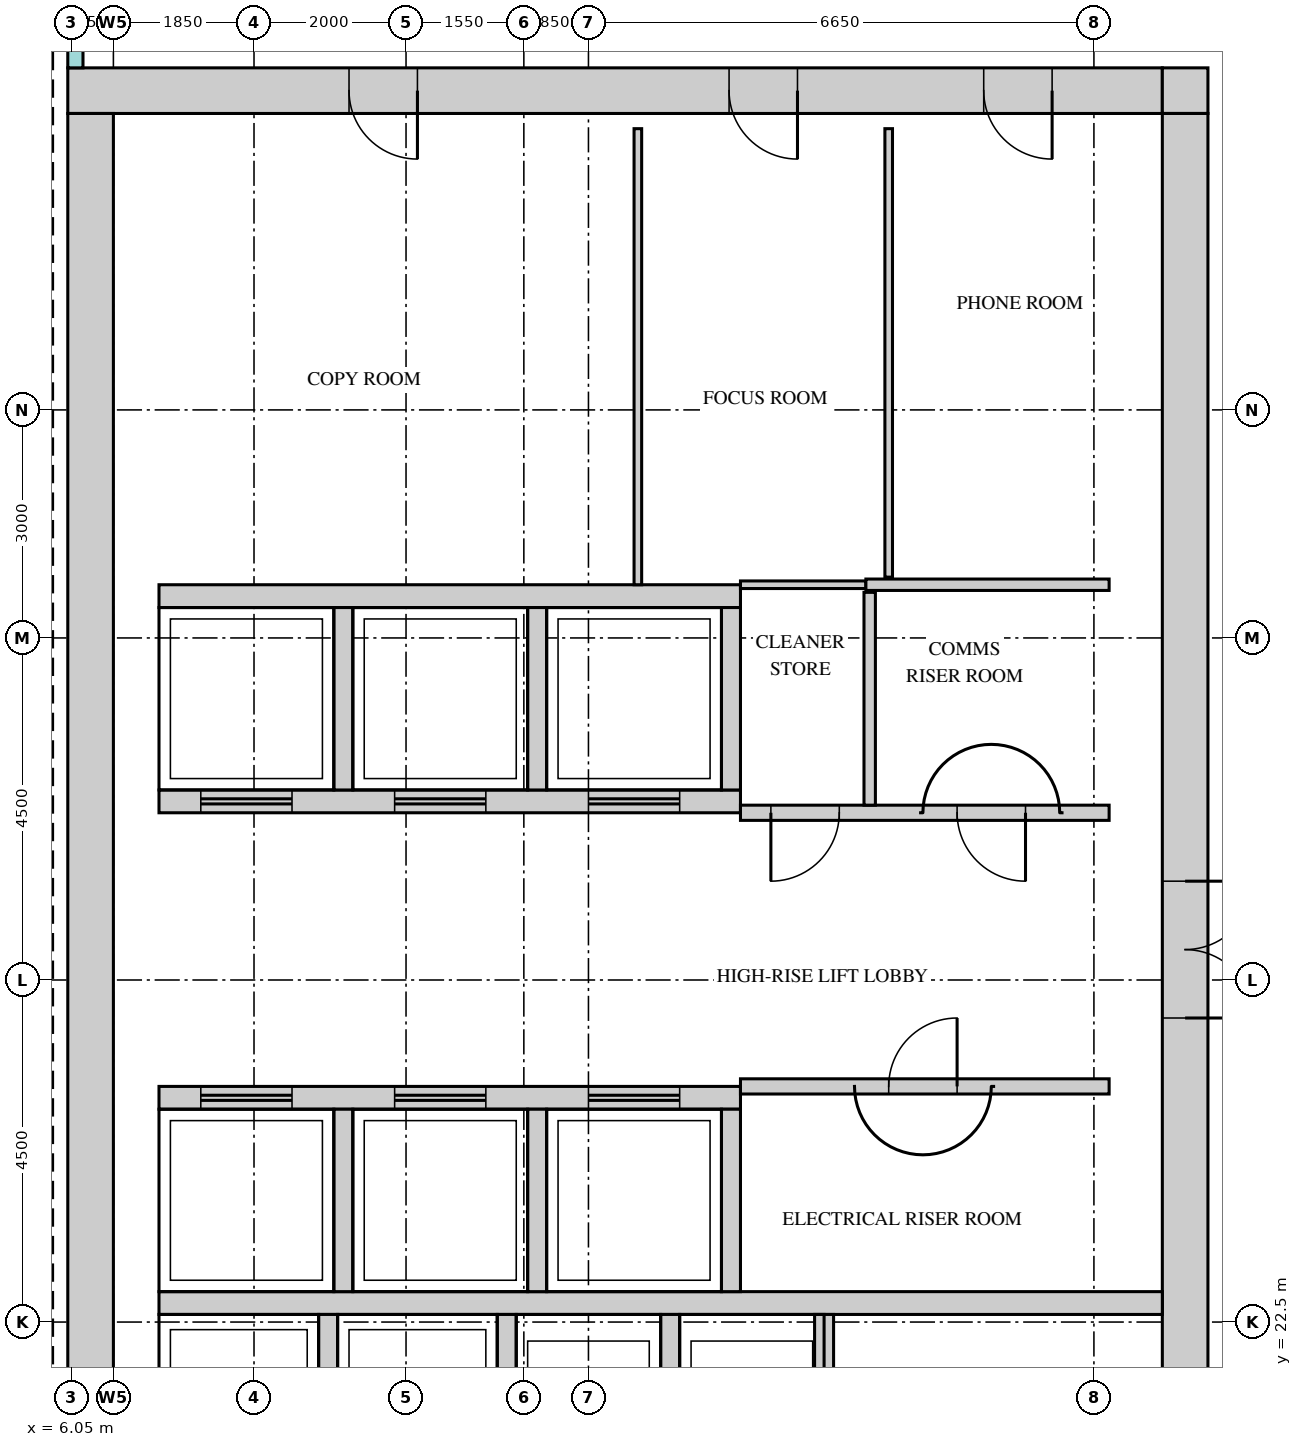
"""IFC4 building model, lengths in metres.
Left out: names, types, materials, properties, quantities, classifications, styles, units other than length and angle.
Written with IfcOpenShell. Run it as: python <this file> out.ifc"""

import sys

from ifc_helpers import new_model, si_unit, direction, frame, frame_2d, origin, place, context, subcontext, project, spatial, rectangle, extrude, source, transform, mapped, element, fill, save


model = new_model("IFC4")
c1 = context("Model", 3, precision=1e-05, world=origin(), true_north=direction((0.0, 1.0)))
c2 = subcontext(c1, "Body", "Model", "MODEL_VIEW")
j1 = project(units=[si_unit("LENGTHUNIT", "METRE"), si_unit("PLANEANGLEUNIT", "RADIAN")], contexts=[c1])
p1 = place(None, origin())
s1 = spatial("IfcSite", under=j1, at=p1, CompositionType="ELEMENT")
p2 = place(p1, origin())
s2 = spatial("IfcBuilding", under=s1, at=p2, CompositionType="ELEMENT")
p3 = place(p2, frame((0.0, 0.0, 298.2)))
s3 = spatial("IfcBuildingStorey", under=s2, at=p3, CompositionType="ELEMENT", Elevation=298.2)
m1 = source(origin(), c2, "Body", "SweptSolid", [
    extrude(rectangle(XDim=14.4, YDim=0.6, at=frame_2d((7.2, 0.0))), origin(), (0.0, 0.0, 1.0), 3.75),
])
p4 = place(p3, frame((6.0, 38.7, 0.0), z_axis=(0.0, 0.0, 1.0), x_axis=(1.0, 0.0, 0.0)))
e1 = element("IfcWall", 1, at=p4, inside=s3, PredefinedType="SHEAR", context=c2, shape_type="MappedRepresentation", body=[
    mapped(m1, transform((0.0, 0.0, 0.0))),
])
m2 = source(origin(), c2, "Body", "SweptSolid", [
    extrude(rectangle(XDim=0.9, YDim=2.1, at=frame_2d((0.45, 1.05))), frame((0.0, 0.31, 0.0), z_axis=(0.0, -1.0, 0.0), x_axis=(1.0, 0.0, 0.0)), (0.0, 0.0, 1.0), 0.62),
])
p5 = place(p4, frame((3.7, 0.0, 0.0)))
e2 = element("IfcOpeningElement", 2, at=p5, cuts=e1, PredefinedType="OPENING", context=c2, shape_type="MappedRepresentation", body=[
    mapped(m2, transform((0.0, 0.0, 0.0))),
])
p6 = place(p4, frame((8.7, 0.0, 0.0)))
e3 = element("IfcOpeningElement", 3, at=p6, cuts=e1, PredefinedType="OPENING", context=c2, shape_type="MappedRepresentation", body=[
    mapped(m2, transform((0.0, 0.0, 0.0))),
])
p7 = place(p4, frame((12.05, 0.0, 0.0)))
e4 = element("IfcOpeningElement", 4, at=p7, cuts=e1, PredefinedType="OPENING", context=c2, shape_type="MappedRepresentation", body=[
    mapped(m2, transform((0.0, 0.0, 0.0))),
])
m3 = source(origin(), c2, "Body", "SweptSolid", [
    extrude(rectangle(XDim=0.6, YDim=0.6, at=frame_2d((0.3, 0.0))), origin(), (0.0, 0.0, 1.0), 3.75),
])
p8 = place(p3, frame((20.4, 38.7, 0.0), z_axis=(0.0, 0.0, 1.0), x_axis=(1.0, 0.0, 0.0)))
e5 = element("IfcWall", 5, at=p8, inside=s3, PredefinedType="SHEAR", context=c2, shape_type="MappedRepresentation", body=[
    mapped(m3, transform((0.0, 0.0, 0.0))),
])
m4 = source(origin(), c2, "Body", "SweptSolid", [
    extrude(rectangle(XDim=22.8, YDim=0.6, at=frame_2d((11.4, 0.0))), origin(), (0.0, 0.0, 1.0), 3.75),
])
p9 = place(p3, frame((20.7, 15.6, 0.0), z_axis=(0.0, 0.0, 1.0), x_axis=(0.0, 1.0, 0.0)))
e6 = element("IfcWall", 6, at=p9, inside=s3, PredefinedType="SHEAR", context=c2, shape_type="MappedRepresentation", body=[
    mapped(m4, transform((0.0, 0.0, 0.0))),
])
m5 = source(origin(), c2, "Body", "SweptSolid", [
    extrude(rectangle(XDim=1.8, YDim=2.1, at=frame_2d((0.9, 1.05))), frame((0.0, 0.31, 0.0), z_axis=(0.0, -1.0, 0.0), x_axis=(1.0, 0.0, 0.0)), (0.0, 0.0, 1.0), 0.62),
])
p10 = place(p9, frame((10.9, 0.0, 0.0)))
e7 = element("IfcOpeningElement", 7, at=p10, cuts=e6, PredefinedType="OPENING", context=c2, shape_type="MappedRepresentation", body=[
    mapped(m5, transform((0.0, 0.0, 0.0))),
])
p11 = place(p9, frame((0.55, 0.0, 0.0)))
e8 = element("IfcOpeningElement", 8, at=p11, cuts=e6, PredefinedType="OPENING", context=c2, shape_type="MappedRepresentation", body=[
    mapped(m2, transform((0.0, 0.0, 0.0))),
])
p12 = place(p9, frame((4.1, 0.0, 0.0)))
e9 = element("IfcOpeningElement", 9, at=p12, cuts=e6, PredefinedType="OPENING", context=c2, shape_type="MappedRepresentation", body=[
    mapped(m2, transform((0.0, 0.0, 0.0))),
])
p13 = place(p3, frame((6.3, 15.6, 0.0), z_axis=(0.0, 0.0, 1.0), x_axis=(0.0, 1.0, 0.0)))
e10 = element("IfcWall", 10, at=p13, inside=s3, PredefinedType="SHEAR", context=c2, shape_type="MappedRepresentation", body=[
    mapped(m4, transform((0.0, 0.0, 0.0))),
])
m6 = source(origin(), c2, "Body", "SweptSolid", [
    extrude(rectangle(XDim=13.2, YDim=0.3, at=frame_2d((6.6, 0.0))), origin(), (0.0, 0.0, 1.0), 3.75),
])
p14 = place(p3, frame((7.2, 22.75, 0.0), z_axis=(0.0, 0.0, 1.0), x_axis=(1.0, 0.0, 0.0)))
e11 = element("IfcWall", 11, at=p14, inside=s3, PredefinedType="STANDARD", context=c2, shape_type="MappedRepresentation", body=[
    mapped(m6, transform((0.0, 0.0, 0.0))),
])
m7 = source(origin(), c2, "Body", "SweptSolid", [
    extrude(rectangle(XDim=7.65, YDim=0.3, at=frame_2d((3.825, 0.0))), origin(), (0.0, 0.0, 1.0), 3.75),
])
p15 = place(p3, frame((7.2, 32.05, 0.0), z_axis=(0.0, 0.0, 1.0), x_axis=(1.0, 0.0, 0.0)))
e12 = element("IfcWall", 12, at=p15, inside=s3, PredefinedType="STANDARD", context=c2, shape_type="MappedRepresentation", body=[
    mapped(m7, transform((0.0, 0.0, 0.0))),
])
p16 = place(p3, frame((7.2, 29.35, 0.0), z_axis=(0.0, 0.0, 1.0), x_axis=(1.0, 0.0, 0.0)))
e13 = element("IfcWall", 13, at=p16, inside=s3, PredefinedType="STANDARD", context=c2, shape_type="MappedRepresentation", body=[
    mapped(m7, transform((0.0, 0.0, 0.0))),
])
m8 = source(origin(), c2, "Body", "SweptSolid", [
    extrude(rectangle(XDim=1.2, YDim=2.1, at=frame_2d((0.6, 1.05))), frame((0.0, 0.16, 0.0), z_axis=(0.0, -1.0, 0.0), x_axis=(1.0, 0.0, 0.0)), (0.0, 0.0, 1.0), 0.32),
])
p17 = place(p16, frame((0.55, 0.0, 0.0)))
e14 = element("IfcOpeningElement", 14, at=p17, cuts=e13, PredefinedType="OPENING", context=c2, shape_type="MappedRepresentation", body=[
    mapped(m8, transform((0.0, 0.0, 0.0))),
])
p18 = place(p16, frame((3.1, 0.0, 0.0)))
e15 = element("IfcOpeningElement", 15, at=p18, cuts=e13, PredefinedType="OPENING", context=c2, shape_type="MappedRepresentation", body=[
    mapped(m8, transform((0.0, 0.0, 0.0))),
])
p19 = place(p16, frame((5.65, 0.0, 0.0)))
e16 = element("IfcOpeningElement", 16, at=p19, cuts=e13, PredefinedType="OPENING", context=c2, shape_type="MappedRepresentation", body=[
    mapped(m8, transform((0.0, 0.0, 0.0))),
])
p20 = place(p3, frame((7.2, 25.45, 0.0), z_axis=(0.0, 0.0, 1.0), x_axis=(1.0, 0.0, 0.0)))
e17 = element("IfcWall", 17, at=p20, inside=s3, PredefinedType="STANDARD", context=c2, shape_type="MappedRepresentation", body=[
    mapped(m7, transform((0.0, 0.0, 0.0))),
])
p21 = place(p20, frame((0.55, 0.0, 0.0)))
e18 = element("IfcOpeningElement", 18, at=p21, cuts=e17, PredefinedType="OPENING", context=c2, shape_type="MappedRepresentation", body=[
    mapped(m8, transform((0.0, 0.0, 0.0))),
])
p22 = place(p20, frame((3.1, 0.0, 0.0)))
e19 = element("IfcOpeningElement", 19, at=p22, cuts=e17, PredefinedType="OPENING", context=c2, shape_type="MappedRepresentation", body=[
    mapped(m8, transform((0.0, 0.0, 0.0))),
])
p23 = place(p20, frame((5.65, 0.0, 0.0)))
e20 = element("IfcOpeningElement", 20, at=p23, cuts=e17, PredefinedType="OPENING", context=c2, shape_type="MappedRepresentation", body=[
    mapped(m8, transform((0.0, 0.0, 0.0))),
])
m9 = source(origin(), c2, "Body", "SweptSolid", [
    extrude(rectangle(XDim=3.1, YDim=0.25, at=frame_2d((1.55, 0.0))), origin(), (0.0, 0.0, 1.0), 3.75),
])
for number, where, z_axis, x_axis in (
    (21, (9.425, 19.5, 0.0), (0.0, 0.0, 1.0), (0.0, 1.0, 0.0)),
    (22, (11.775, 19.5, 0.0), (0.0, 0.0, 1.0), (0.0, 1.0, 0.0)),
    (23, (13.925, 19.5, 0.0), (0.0, 0.0, 1.0), (0.0, 1.0, 0.0)),
    (24, (15.95, 19.5, 0.0), (0.0, 0.0, 1.0), (0.0, 1.0, 0.0)),
):
    element("IfcWall", number, at=place(p3, frame(where, z_axis=z_axis, x_axis=x_axis)), inside=s3, PredefinedType="STANDARD", context=c2, shape_type="MappedRepresentation", body=[
        mapped(m9, transform((0.0, 0.0, 0.0))),
    ])
m10 = source(origin(), c2, "Body", "SweptSolid", [
    extrude(rectangle(XDim=2.4, YDim=0.25, at=frame_2d((1.2, 0.0))), origin(), (0.0, 0.0, 1.0), 3.75),
])
for number, where, z_axis, x_axis in (
    (25, (9.625, 29.5, 0.0), (0.0, 0.0, 1.0), (0.0, 1.0, 0.0)),
    (26, (12.175, 29.5, 0.0), (0.0, 0.0, 1.0), (0.0, 1.0, 0.0)),
    (27, (14.725, 29.5, 0.0), (0.0, 0.0, 1.0), (0.0, 1.0, 0.0)),
):
    element("IfcWall", number, at=place(p3, frame(where, z_axis=z_axis, x_axis=x_axis)), inside=s3, PredefinedType="STANDARD", context=c2, shape_type="MappedRepresentation", body=[
        mapped(m10, transform((0.0, 0.0, 0.0))),
    ])
m11 = source(origin(), c2, "Body", "SweptSolid", [
    extrude(rectangle(XDim=2.4, YDim=0.25, at=frame_2d((1.2, 0.0))), origin(), (0.0, 0.0, 1.0), 3.75),
])
for number, where, z_axis, x_axis in (
    (28, (9.625, 22.9, 0.0), (0.0, 0.0, 1.0), (0.0, 1.0, 0.0)),
    (29, (12.175, 22.9, 0.0), (0.0, 0.0, 1.0), (0.0, 1.0, 0.0)),
    (30, (14.725, 22.9, 0.0), (0.0, 0.0, 1.0), (0.0, 1.0, 0.0)),
):
    element("IfcWall", number, at=place(p3, frame(where, z_axis=z_axis, x_axis=x_axis)), inside=s3, PredefinedType="STANDARD", context=c2, shape_type="MappedRepresentation", body=[
        mapped(m11, transform((0.0, 0.0, 0.0))),
    ])
m12 = source(origin(), c2, "Body", "SweptSolid", [
    extrude(rectangle(XDim=4.85, YDim=0.2, at=frame_2d((2.425, 0.0))), origin(), (0.0, 0.0, 1.0), 3.8),
])
p24 = place(p3, frame((14.85, 25.6, 0.0), z_axis=(0.0, 0.0, 1.0), x_axis=(1.0, 0.0, 0.0)))
e31 = element("IfcWall", 31, at=p24, inside=s3, PredefinedType="PARTITIONING", context=c2, shape_type="MappedRepresentation", body=[
    mapped(m12, transform((0.0, 0.0, 0.0))),
])
m13 = source(origin(), c2, "Body", "SweptSolid", [
    extrude(rectangle(XDim=0.9, YDim=2.1, at=frame_2d((0.45, 1.05))), frame((0.0, 0.11, 0.0), z_axis=(0.0, -1.0, 0.0), x_axis=(1.0, 0.0, 0.0)), (0.0, 0.0, 1.0), 0.22),
])
p25 = place(p24, frame((1.95, 0.0, 0.0)))
e32 = element("IfcOpeningElement", 32, at=p25, cuts=e31, PredefinedType="OPENING", context=c2, shape_type="MappedRepresentation", body=[
    mapped(m13, transform((0.0, 0.0, 0.0))),
])
p26 = place(p3, frame((14.85, 29.2, 0.0), z_axis=(0.0, 0.0, 1.0), x_axis=(1.0, 0.0, 0.0)))
e33 = element("IfcWall", 33, at=p26, inside=s3, PredefinedType="PARTITIONING", context=c2, shape_type="MappedRepresentation", body=[
    mapped(m12, transform((0.0, 0.0, 0.0))),
])
p27 = place(p26, frame((0.4, 0.0, 0.0)))
e34 = element("IfcOpeningElement", 34, at=p27, cuts=e33, PredefinedType="OPENING", context=c2, shape_type="MappedRepresentation", body=[
    mapped(m13, transform((0.0, 0.0, 0.0))),
])
p28 = place(p26, frame((2.85, 0.0, 0.0)))
e35 = element("IfcOpeningElement", 35, at=p28, cuts=e33, PredefinedType="OPENING", context=c2, shape_type="MappedRepresentation", body=[
    mapped(m13, transform((0.0, 0.0, 0.0))),
])
m14 = source(origin(), c2, "Body", "SweptSolid", [
    extrude(rectangle(XDim=2.8, YDim=0.15, at=frame_2d((1.4, 0.0))), origin(), (0.0, 0.0, 1.0), 3.8),
])
p29 = place(p3, frame((16.55, 29.3, 0.0), z_axis=(0.0, 0.0, 1.0), x_axis=(0.0, 1.0, 0.0)))
e36 = element("IfcWall", 36, at=p29, inside=s3, PredefinedType="PARTITIONING", context=c2, shape_type="MappedRepresentation", body=[
    mapped(m14, transform((0.0, 0.0, 0.0))),
])
m15 = source(origin(), c2, "Body", "SweptSolid", [
    extrude(rectangle(XDim=6.0, YDim=0.1, at=frame_2d((3.0, 0.0))), origin(), (0.0, 0.0, 1.0), 3.8),
])
p30 = place(p3, frame((13.5, 32.2, 0.0), z_axis=(0.0, 0.0, 1.0), x_axis=(0.0, 1.0, 0.0)))
e37 = element("IfcWall", 37, at=p30, inside=s3, PredefinedType="PARTITIONING", context=c2, shape_type="MappedRepresentation", body=[
    mapped(m15, transform((0.0, 0.0, 0.0))),
])
m16 = source(origin(), c2, "Body", "SweptSolid", [
    extrude(rectangle(XDim=1.65, YDim=0.1, at=frame_2d((0.825, 0.0))), origin(), (0.0, 0.0, 1.0), 3.8),
])
p31 = place(p3, frame((14.85, 32.2, 0.0), z_axis=(0.0, 0.0, 1.0), x_axis=(1.0, 0.0, 0.0)))
e38 = element("IfcWall", 38, at=p31, inside=s3, PredefinedType="PARTITIONING", context=c2, shape_type="MappedRepresentation", body=[
    mapped(m16, transform((0.0, 0.0, 0.0))),
])
m17 = source(origin(), c2, "Body", "SweptSolid", [
    extrude(rectangle(XDim=3.2, YDim=0.15, at=frame_2d((1.6, 0.0))), origin(), (0.0, 0.0, 1.0), 3.8),
])
p32 = place(p3, frame((16.5, 32.2, 0.0), z_axis=(0.0, 0.0, 1.0), x_axis=(1.0, 0.0, 0.0)))
e39 = element("IfcWall", 39, at=p32, inside=s3, PredefinedType="PARTITIONING", context=c2, shape_type="MappedRepresentation", body=[
    mapped(m17, transform((0.0, 0.0, 0.0))),
])
m18 = source(origin(), c2, "Body", "SweptSolid", [
    extrude(rectangle(XDim=5.9, YDim=0.1, at=frame_2d((2.95, 0.0))), origin(), (0.0, 0.0, 1.0), 3.8),
])
p33 = place(p3, frame((16.8, 32.3, 0.0), z_axis=(0.0, 0.0, 1.0), x_axis=(0.0, 1.0, 0.0)))
e40 = element("IfcWall", 40, at=p33, inside=s3, PredefinedType="PARTITIONING", context=c2, shape_type="MappedRepresentation", body=[
    mapped(m18, transform((0.0, 0.0, 0.0))),
])
m19 = source(origin(), c2, "Body", "SweptSolid", [
    extrude(rectangle(XDim=0.9, YDim=2.1, at=frame_2d((0.45, 1.05))), frame((0.0, 0.025, 0.0), z_axis=(0.0, -1.0, 0.0), x_axis=(1.0, 0.0, 0.0)), (0.0, 0.0, 1.0), 0.05),
])
p34 = place(p25, origin())
e41 = element("IfcDoor", 41, at=p34, inside=s3, OperationType="SINGLE_SWING_LEFT", PredefinedType="DOOR", context=c2, shape_type="MappedRepresentation", body=[
    mapped(m19, transform((0.0, 0.0, 0.0))),
])
fill(e32, e41)
p35 = place(p27, origin())
e42 = element("IfcDoor", 42, at=p35, inside=s3, OperationType="SINGLE_SWING_LEFT", PredefinedType="DOOR", context=c2, shape_type="MappedRepresentation", body=[
    mapped(m19, transform((0.0, 0.0, 0.0))),
])
fill(e34, e42)
p36 = place(p28, origin())
e43 = element("IfcDoor", 43, at=p36, inside=s3, OperationType="SINGLE_SWING_RIGHT", PredefinedType="DOOR", context=c2, shape_type="MappedRepresentation", body=[
    mapped(m19, transform((0.0, 0.0, 0.0))),
])
fill(e35, e43)
m20 = source(origin(), c2, "Body", "SweptSolid", [
    extrude(rectangle(XDim=1.8, YDim=2.1, at=frame_2d((0.9, 1.05))), frame((0.0, 0.25, 0.0), z_axis=(0.0, -1.0, 0.0), x_axis=(1.0, 0.0, 0.0)), (0.0, 0.0, 1.0), 0.5),
])
p37 = place(p10, origin())
e44 = element("IfcDoor", 44, at=p37, inside=s3, OperationType="DOUBLE_DOOR_SINGLE_SWING", PredefinedType="DOOR", context=c2, shape_type="MappedRepresentation", body=[
    mapped(m20, transform((0.0, 0.0, 0.0))),
])
fill(e7, e44)
m21 = source(origin(), c2, "Body", "SweptSolid", [
    extrude(rectangle(XDim=0.9, YDim=2.1, at=frame_2d((0.45, 1.05))), frame((0.0, 0.25, 0.0), z_axis=(0.0, -1.0, 0.0), x_axis=(1.0, 0.0, 0.0)), (0.0, 0.0, 1.0), 0.5),
])
p38 = place(p5, origin())
e45 = element("IfcDoor", 45, at=p38, inside=s3, OperationType="SINGLE_SWING_RIGHT", PredefinedType="DOOR", context=c2, shape_type="MappedRepresentation", body=[
    mapped(m21, transform((0.0, 0.0, 0.0))),
])
fill(e2, e45)
p39 = place(p6, origin())
e46 = element("IfcDoor", 46, at=p39, inside=s3, OperationType="SINGLE_SWING_RIGHT", PredefinedType="DOOR", context=c2, shape_type="MappedRepresentation", body=[
    mapped(m21, transform((0.0, 0.0, 0.0))),
])
fill(e3, e46)
p40 = place(p7, origin())
e47 = element("IfcDoor", 47, at=p40, inside=s3, OperationType="SINGLE_SWING_RIGHT", PredefinedType="DOOR", context=c2, shape_type="MappedRepresentation", body=[
    mapped(m21, transform((0.0, 0.0, 0.0))),
])
fill(e4, e47)
m22 = source(origin(), c2, "Body", "SweptSolid", [
    extrude(rectangle(XDim=1.2, YDim=2.1, at=frame_2d((0.6, 1.05))), frame((0.0, 0.025, 0.0), z_axis=(0.0, -1.0, 0.0), x_axis=(1.0, 0.0, 0.0)), (0.0, 0.0, 1.0), 0.05),
])
p41 = place(p21, origin())
e48 = element("IfcDoor", 48, at=p41, inside=s3, OperationType="DOUBLE_DOOR_SLIDING", PredefinedType="DOOR", context=c2, shape_type="MappedRepresentation", body=[
    mapped(m22, transform((0.0, 0.0, 0.0))),
])
fill(e18, e48)
p42 = place(p22, origin())
e49 = element("IfcDoor", 49, at=p42, inside=s3, OperationType="DOUBLE_DOOR_SLIDING", PredefinedType="DOOR", context=c2, shape_type="MappedRepresentation", body=[
    mapped(m22, transform((0.0, 0.0, 0.0))),
])
fill(e19, e49)
p43 = place(p23, origin())
e50 = element("IfcDoor", 50, at=p43, inside=s3, OperationType="DOUBLE_DOOR_SLIDING", PredefinedType="DOOR", context=c2, shape_type="MappedRepresentation", body=[
    mapped(m22, transform((0.0, 0.0, 0.0))),
])
fill(e20, e50)
p44 = place(p17, origin())
e51 = element("IfcDoor", 51, at=p44, inside=s3, OperationType="DOUBLE_DOOR_SLIDING", PredefinedType="DOOR", context=c2, shape_type="MappedRepresentation", body=[
    mapped(m22, transform((0.0, 0.0, 0.0))),
])
fill(e14, e51)
p45 = place(p18, origin())
e52 = element("IfcDoor", 52, at=p45, inside=s3, OperationType="DOUBLE_DOOR_SLIDING", PredefinedType="DOOR", context=c2, shape_type="MappedRepresentation", body=[
    mapped(m22, transform((0.0, 0.0, 0.0))),
])
fill(e15, e52)
p46 = place(p19, origin())
e53 = element("IfcDoor", 53, at=p46, inside=s3, OperationType="DOUBLE_DOOR_SLIDING", PredefinedType="DOOR", context=c2, shape_type="MappedRepresentation", body=[
    mapped(m22, transform((0.0, 0.0, 0.0))),
])
fill(e16, e53)
save(model, sys.argv[1])
